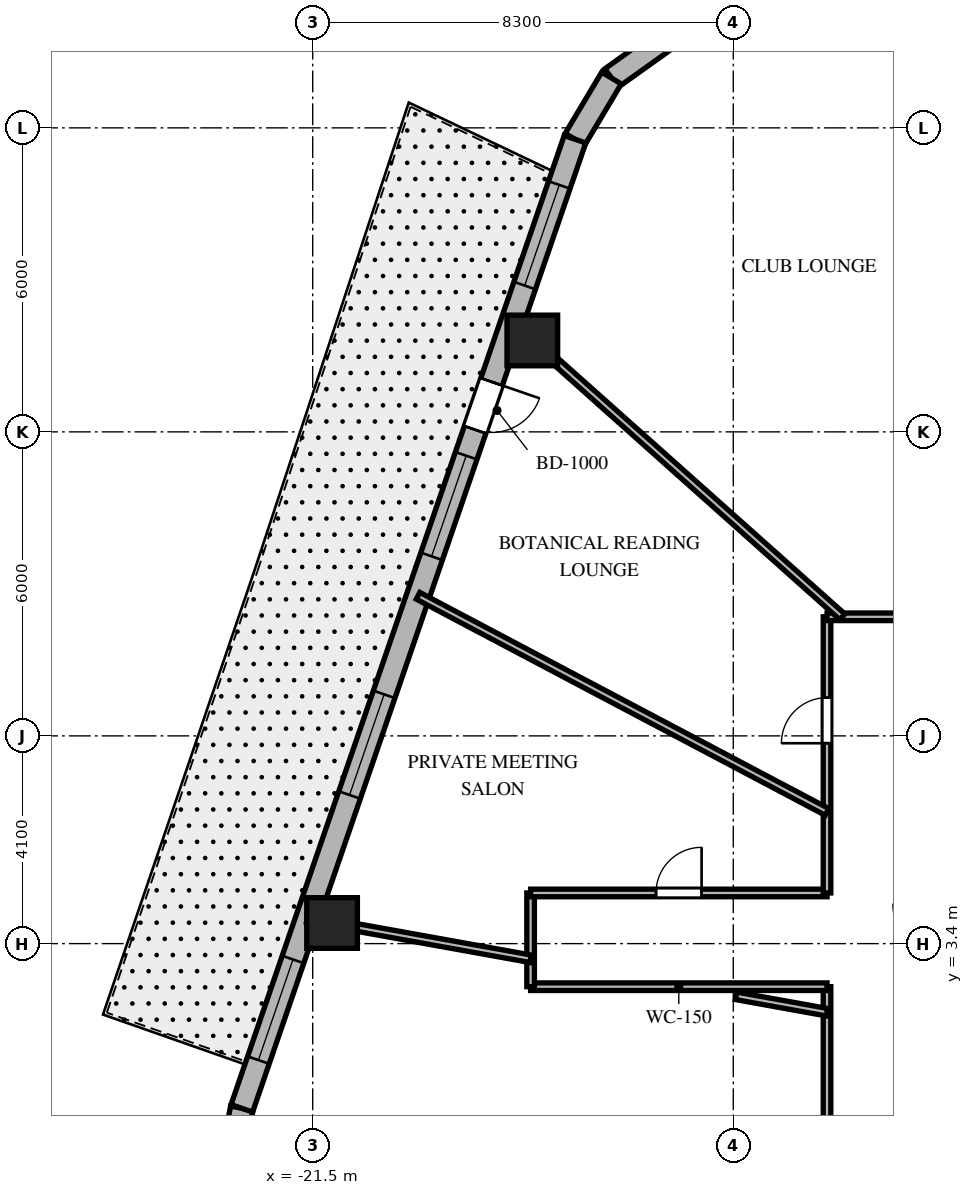
"""IFC4 building model, lengths in metres.
Left out: names, types, materials, properties, quantities, classifications, styles, units other than length and angle.
Written with IfcOpenShell. Run it as: python <this file> out.ifc"""

import sys

from ifc_helpers import new_model, si_unit, direction, frame, frame_2d, origin, origin_2d, place, context, subcontext, project, spatial, rectangle, extrude, element, fill, save


model = new_model("IFC4")
c1 = context("Model", 3, precision=1e-05, world=origin(), true_north=direction((0.0, 1.0)))
c2 = subcontext(c1, "Body", "Model", "MODEL_VIEW")
j1 = project(units=[si_unit("LENGTHUNIT", "METRE"), si_unit("PLANEANGLEUNIT", "RADIAN")], contexts=[c1])
p1 = place(None, origin())
s1 = spatial("IfcSite", under=j1, at=p1, CompositionType="ELEMENT")
p2 = place(p1, origin())
s2 = spatial("IfcBuilding", under=s1, at=p2, CompositionType="ELEMENT")
p3 = place(p2, frame((0.0, 0.0, 233.1)))
s3 = spatial("IfcBuildingStorey", under=s2, at=p3, CompositionType="ELEMENT", Elevation=233.1)
for number, where, z_axis, x_axis in (
    (1, (-17.166, 15.304, 0.0), (0.0, 0.0, 1.0), (1.0, 0.0, 0.0)),
    (2, (-21.118, 3.807, 0.0), (0.0, 0.0, 1.0), (1.0, 0.0, 0.0)),
):
    element("IfcColumn", number, at=place(p3, frame(where, z_axis=z_axis, x_axis=x_axis)), inside=s3, PredefinedType="COLUMN", context=c2, shape_type="SweptSolid", body=[
        extrude(rectangle(XDim=1.0, YDim=1.0, at=origin_2d()), origin(), (0.0, 0.0, 1.0), 3.8),
    ])
p4 = place(p3, frame((-14.478, 21.287, 0.0), z_axis=(0.0, 0.0, 1.0), x_axis=(-0.813888518617, -0.58102106611, 0.0)))
e3 = element("IfcWall", 3, at=p4, inside=s3, PredefinedType="SOLIDWALL", context=c2, shape_type="SweptSolid", body=[
    extrude(rectangle(XDim=1.383, YDim=0.45, at=frame_2d((0.691, 0.0))), origin(), (0.0, 0.0, 1.0), 3.5),
])
p5 = place(p3, frame((-15.604, 20.483, 0.0), z_axis=(0.0, 0.0, 1.0), x_axis=(-0.512222149036, -0.858852996756, 0.0)))
e4 = element("IfcWall", 4, at=p5, inside=s3, PredefinedType="SOLIDWALL", context=c2, shape_type="SweptSolid", body=[
    extrude(rectangle(XDim=1.406, YDim=0.45, at=frame_2d((0.703, 0.0))), origin(), (0.0, 0.0, 1.0), 3.5),
])
p6 = place(p3, frame((-22.898, 0.15, 0.0), z_axis=(0.0, 0.0, 1.0), x_axis=(-0.199055826889, -0.979988151858, 0.0)))
e5 = element("IfcWall", 5, at=p6, inside=s3, PredefinedType="SOLIDWALL", context=c2, shape_type="SweptSolid", body=[
    extrude(rectangle(XDim=0.894, YDim=0.45, at=frame_2d((0.447, 0.0))), origin(), (0.0, 0.0, 1.0), 3.5),
])
p7 = place(p3, frame((-16.324, 19.275, 0.0), z_axis=(0.0, 0.0, 1.0), x_axis=(-0.325083142304, -0.945685439557, 0.0)))
e6 = element("IfcWall", 6, at=p7, inside=s3, PredefinedType="SOLIDWALL", context=c2, shape_type="SweptSolid", body=[
    extrude(rectangle(XDim=20.224, YDim=0.45, at=frame_2d((10.112, 0.0))), origin(), (0.0, 0.0, 1.0), 3.5),
])
p8 = place(p7, frame((5.062, 0.0, 0.0)))
e7 = element("IfcOpeningElement", 7, at=p8, cuts=e6, PredefinedType="OPENING", context=c2, shape_type="SweptSolid", body=[
    extrude(rectangle(XDim=1.0, YDim=2.15, at=frame_2d((0.5, 1.075))), frame((0.0, 0.235, 0.0), z_axis=(0.0, -1.0, 0.0), x_axis=(1.0, 0.0, 0.0)), (0.0, 0.0, 1.0), 0.47),
])
p9 = place(p7, frame((0.953, 0.0, 0.8)))
e8 = element("IfcOpeningElement", 8, at=p9, cuts=e6, PredefinedType="OPENING", context=c2, shape_type="SweptSolid", body=[
    extrude(rectangle(XDim=2.1, YDim=1.85, at=frame_2d((1.05, 0.925))), frame((0.0, 0.235, 0.0), z_axis=(0.0, -1.0, 0.0), x_axis=(1.0, 0.0, 0.0)), (0.0, 0.0, 1.0), 0.47),
])
p10 = place(p7, frame((6.604, 0.0, 0.8)))
e9 = element("IfcOpeningElement", 9, at=p10, cuts=e6, PredefinedType="OPENING", context=c2, shape_type="SweptSolid", body=[
    extrude(rectangle(XDim=2.1, YDim=1.85, at=frame_2d((1.05, 0.925))), frame((0.0, 0.235, 0.0), z_axis=(0.0, -1.0, 0.0), x_axis=(1.0, 0.0, 0.0)), (0.0, 0.0, 1.0), 0.47),
])
p11 = place(p7, frame((11.585, 0.0, 0.8)))
e10 = element("IfcOpeningElement", 10, at=p11, cuts=e6, PredefinedType="OPENING", context=c2, shape_type="SweptSolid", body=[
    extrude(rectangle(XDim=2.1, YDim=1.85, at=frame_2d((1.05, 0.925))), frame((0.0, 0.235, 0.0), z_axis=(0.0, -1.0, 0.0), x_axis=(1.0, 0.0, 0.0)), (0.0, 0.0, 1.0), 0.47),
])
p12 = place(p7, frame((17.118, 0.0, 0.8)))
e11 = element("IfcOpeningElement", 11, at=p12, cuts=e6, PredefinedType="OPENING", context=c2, shape_type="SweptSolid", body=[
    extrude(rectangle(XDim=2.1, YDim=1.85, at=frame_2d((1.05, 0.925))), frame((0.0, 0.235, 0.0), z_axis=(0.0, -1.0, 0.0), x_axis=(1.0, 0.0, 0.0)), (0.0, 0.0, 1.0), 0.47),
])
p13 = place(p3, frame((-11.35, -9.85, 0.0), z_axis=(0.0, 0.0, 1.0), x_axis=(0.0, 1.0, 0.0)))
e12 = element("IfcWall", 12, at=p13, inside=s3, PredefinedType="PARTITIONING", context=c2, shape_type="SweptSolid", body=[
    extrude(rectangle(XDim=12.4, YDim=0.15, at=frame_2d((6.2, 0.0))), origin(), (0.0, 0.0, 1.0), 2.99),
])
p14 = place(p13, frame((8.835, 0.0, 0.0)))
e13 = element("IfcOpeningElement", 13, at=p14, cuts=e12, PredefinedType="OPENING", context=c2, shape_type="SweptSolid", body=[
    extrude(rectangle(XDim=0.95, YDim=2.03, at=frame_2d((0.475, 1.015))), frame((0.0, 0.085, 0.0), z_axis=(0.0, -1.0, 0.0), x_axis=(1.0, 0.0, 0.0)), (0.0, 0.0, 1.0), 0.17),
])
p15 = place(p13, frame((3.01, 0.0, 0.0)))
e14 = element("IfcOpeningElement", 14, at=p15, cuts=e12, PredefinedType="OPENING", context=c2, shape_type="SweptSolid", body=[
    extrude(rectangle(XDim=0.95, YDim=2.03, at=frame_2d((0.475, 1.015))), frame((0.0, 0.085, 0.0), z_axis=(0.0, -1.0, 0.0), x_axis=(1.0, 0.0, 0.0)), (0.0, 0.0, 1.0), 0.17),
])
p16 = place(p3, frame((-11.35, 2.55, 0.0), z_axis=(0.0, 0.0, 1.0), x_axis=(-1.0, 0.0, 0.0)))
e15 = element("IfcWall", 15, at=p16, inside=s3, PredefinedType="PARTITIONING", context=c2, shape_type="SweptSolid", body=[
    extrude(rectangle(XDim=5.85, YDim=0.15, at=frame_2d((2.925, 0.0))), origin(), (0.0, 0.0, 1.0), 2.94),
])
p17 = place(p3, frame((-17.2, 2.55, 0.0), z_axis=(0.0, 0.0, 1.0), x_axis=(0.0, 1.0, 0.0)))
e16 = element("IfcWall", 16, at=p17, inside=s3, PredefinedType="PARTITIONING", context=c2, shape_type="SweptSolid", body=[
    extrude(rectangle(XDim=1.85, YDim=0.15, at=frame_2d((0.925, 0.0))), origin(), (0.0, 0.0, 1.0), 2.94),
])
p18 = place(p3, frame((-17.2, 4.4, 0.0), z_axis=(0.0, 0.0, 1.0), x_axis=(1.0, 0.0, 0.0)))
e17 = element("IfcWall", 17, at=p18, inside=s3, PredefinedType="PARTITIONING", context=c2, shape_type="SweptSolid", body=[
    extrude(rectangle(XDim=5.85, YDim=0.15, at=frame_2d((2.925, 0.0))), origin(), (0.0, 0.0, 1.0), 2.94),
])
p19 = place(p18, frame((2.475, 0.0, 0.0)))
e18 = element("IfcOpeningElement", 18, at=p19, cuts=e17, PredefinedType="OPENING", context=c2, shape_type="SweptSolid", body=[
    extrude(rectangle(XDim=0.9, YDim=2.03, at=frame_2d((0.45, 1.015))), frame((0.0, 0.085, 0.0), z_axis=(0.0, -1.0, 0.0), x_axis=(1.0, 0.0, 0.0)), (0.0, 0.0, 1.0), 0.17),
])
p20 = place(p3, frame((-11.35, 4.4, 0.0), z_axis=(0.0, 0.0, 1.0), x_axis=(0.0, 1.0, 0.0)))
e19 = element("IfcWall", 19, at=p20, inside=s3, PredefinedType="PARTITIONING", context=c2, shape_type="SweptSolid", body=[
    extrude(rectangle(XDim=5.45, YDim=0.15, at=frame_2d((2.725, 0.0))), origin(), (0.0, 0.0, 1.0), 2.99),
])
p21 = place(p20, frame((2.955, 0.0, 0.0)))
e20 = element("IfcOpeningElement", 20, at=p21, cuts=e19, PredefinedType="OPENING", context=c2, shape_type="SweptSolid", body=[
    extrude(rectangle(XDim=0.9, YDim=2.03, at=frame_2d((0.45, 1.015))), frame((0.0, 0.085, 0.0), z_axis=(0.0, -1.0, 0.0), x_axis=(1.0, 0.0, 0.0)), (0.0, 0.0, 1.0), 0.17),
])
p22 = place(p3, frame((-11.35, 9.85, 0.0), z_axis=(0.0, 0.0, 1.0), x_axis=(1.0, 0.0, 0.0)))
e21 = element("IfcWall", 21, at=p22, inside=s3, PredefinedType="PARTITIONING", context=c2, shape_type="SweptSolid", body=[
    extrude(rectangle(XDim=10.43, YDim=0.15, at=frame_2d((5.215, 0.0))), origin(), (0.0, 0.0, 1.0), 2.99),
])
p23 = place(p22, frame((8.362, 0.0, 0.0)))
e22 = element("IfcOpeningElement", 22, at=p23, cuts=e21, PredefinedType="OPENING", context=c2, shape_type="SweptSolid", body=[
    extrude(rectangle(XDim=0.95, YDim=2.03, at=frame_2d((0.475, 1.015))), frame((0.0, 0.085, 0.0), z_axis=(0.0, -1.0, 0.0), x_axis=(1.0, 0.0, 0.0)), (0.0, 0.0, 1.0), 0.17),
])
p24 = place(p22, frame((3.396, 0.0, 0.0)))
e23 = element("IfcOpeningElement", 23, at=p24, cuts=e21, PredefinedType="OPENING", context=c2, shape_type="SweptSolid", body=[
    extrude(rectangle(XDim=0.95, YDim=2.03, at=frame_2d((0.475, 1.015))), frame((0.0, 0.085, 0.0), z_axis=(0.0, -1.0, 0.0), x_axis=(1.0, 0.0, 0.0)), (0.0, 0.0, 1.0), 0.17),
])
p25 = place(p3, frame((-11.048, 9.85, 0.0), z_axis=(0.0, 0.0, 1.0), x_axis=(-0.746444434655, 0.665447748492, 0.0)))
e24 = element("IfcWall", 24, at=p25, inside=s3, PredefinedType="PARTITIONING", context=c2, shape_type="SweptSolid", body=[
    extrude(rectangle(XDim=8.732, YDim=0.15, at=frame_2d((4.366, 0.0))), origin(), (0.0, 0.0, 1.0), 2.74),
])
p26 = place(p3, frame((-11.35, 5.999, 0.0), z_axis=(0.0, 0.0, 1.0), x_axis=(-0.884112301724, 0.467274478161, 0.0)))
e25 = element("IfcWall", 25, at=p26, inside=s3, PredefinedType="PARTITIONING", context=c2, shape_type="SweptSolid", body=[
    extrude(rectangle(XDim=9.129, YDim=0.15, at=frame_2d((4.564, 0.0))), origin(), (0.0, 0.0, 1.0), 2.74),
])
p27 = place(p3, frame((-11.35, 2.046, 0.0), z_axis=(0.0, 0.0, 1.0), x_axis=(-0.984127783205, 0.177461281195, 0.0)))
e26 = element("IfcWall", 26, at=p27, inside=s3, PredefinedType="PARTITIONING", context=c2, shape_type="SweptSolid", body=[
    extrude(rectangle(XDim=1.826, YDim=0.15, at=frame_2d((0.913, 0.0))), origin(), (0.0, 0.0, 1.0), 3.5),
])
p28 = place(p3, frame((-17.2, 3.101, 0.0), z_axis=(0.0, 0.0, 1.0), x_axis=(-0.98413465883, 0.177423147559, 0.0)))
e27 = element("IfcWall", 27, at=p28, inside=s3, PredefinedType="PARTITIONING", context=c2, shape_type="SweptSolid", body=[
    extrude(rectangle(XDim=4.482, YDim=0.15, at=frame_2d((2.241, 0.0))), origin(), (0.0, 0.0, 1.0), 2.74),
])
p29 = place(p8, origin())
e28 = element("IfcDoor", 28, at=p29, inside=s3, OperationType="SINGLE_SWING_LEFT", PredefinedType="DOOR", context=c2, shape_type="SweptSolid", body=[
    extrude(rectangle(XDim=1.0, YDim=2.15, at=frame_2d((0.5, 1.075))), frame((0.0, 0.025, 0.0), z_axis=(0.0, -1.0, 0.0), x_axis=(1.0, 0.0, 0.0)), (0.0, 0.0, 1.0), 0.05),
])
fill(e7, e28)
p30 = place(p9, origin())
e29 = element("IfcWindow", 29, at=p30, inside=s3, PartitioningType="SINGLE_PANEL", PredefinedType="WINDOW", context=c2, shape_type="SweptSolid", body=[
    extrude(rectangle(XDim=2.1, YDim=1.85, at=frame_2d((1.05, 0.925))), frame((0.0, 0.03, 0.0), z_axis=(0.0, -1.0, 0.0), x_axis=(1.0, 0.0, 0.0)), (0.0, 0.0, 1.0), 0.06),
])
fill(e8, e29)
p31 = place(p10, origin())
e30 = element("IfcWindow", 30, at=p31, inside=s3, PartitioningType="SINGLE_PANEL", PredefinedType="WINDOW", context=c2, shape_type="SweptSolid", body=[
    extrude(rectangle(XDim=2.1, YDim=1.85, at=frame_2d((1.05, 0.925))), frame((0.0, 0.03, 0.0), z_axis=(0.0, -1.0, 0.0), x_axis=(1.0, 0.0, 0.0)), (0.0, 0.0, 1.0), 0.06),
])
fill(e9, e30)
p32 = place(p11, origin())
e31 = element("IfcWindow", 31, at=p32, inside=s3, PartitioningType="SINGLE_PANEL", PredefinedType="WINDOW", context=c2, shape_type="SweptSolid", body=[
    extrude(rectangle(XDim=2.1, YDim=1.85, at=frame_2d((1.05, 0.925))), frame((0.0, 0.03, 0.0), z_axis=(0.0, -1.0, 0.0), x_axis=(1.0, 0.0, 0.0)), (0.0, 0.0, 1.0), 0.06),
])
fill(e10, e31)
p33 = place(p12, origin())
e32 = element("IfcWindow", 32, at=p33, inside=s3, PartitioningType="SINGLE_PANEL", PredefinedType="WINDOW", context=c2, shape_type="SweptSolid", body=[
    extrude(rectangle(XDim=2.1, YDim=1.85, at=frame_2d((1.05, 0.925))), frame((0.0, 0.03, 0.0), z_axis=(0.0, -1.0, 0.0), x_axis=(1.0, 0.0, 0.0)), (0.0, 0.0, 1.0), 0.06),
])
fill(e11, e32)
p34 = place(p21, origin())
e33 = element("IfcDoor", 33, at=p34, inside=s3, OperationType="SINGLE_SWING_LEFT", PredefinedType="DOOR", context=c2, shape_type="SweptSolid", body=[
    extrude(rectangle(XDim=0.9, YDim=2.03, at=frame_2d((0.45, 1.015))), frame((0.0, 0.025, 0.0), z_axis=(0.0, -1.0, 0.0), x_axis=(1.0, 0.0, 0.0)), (0.0, 0.0, 1.0), 0.05),
])
fill(e20, e33)
p35 = place(p19, origin())
e34 = element("IfcDoor", 34, at=p35, inside=s3, OperationType="SINGLE_SWING_RIGHT", PredefinedType="DOOR", context=c2, shape_type="SweptSolid", body=[
    extrude(rectangle(XDim=0.9, YDim=2.03, at=frame_2d((0.45, 1.015))), frame((0.0, 0.025, 0.0), z_axis=(0.0, -1.0, 0.0), x_axis=(1.0, 0.0, 0.0)), (0.0, 0.0, 1.0), 0.05),
])
fill(e18, e34)
save(model, sys.argv[1])
